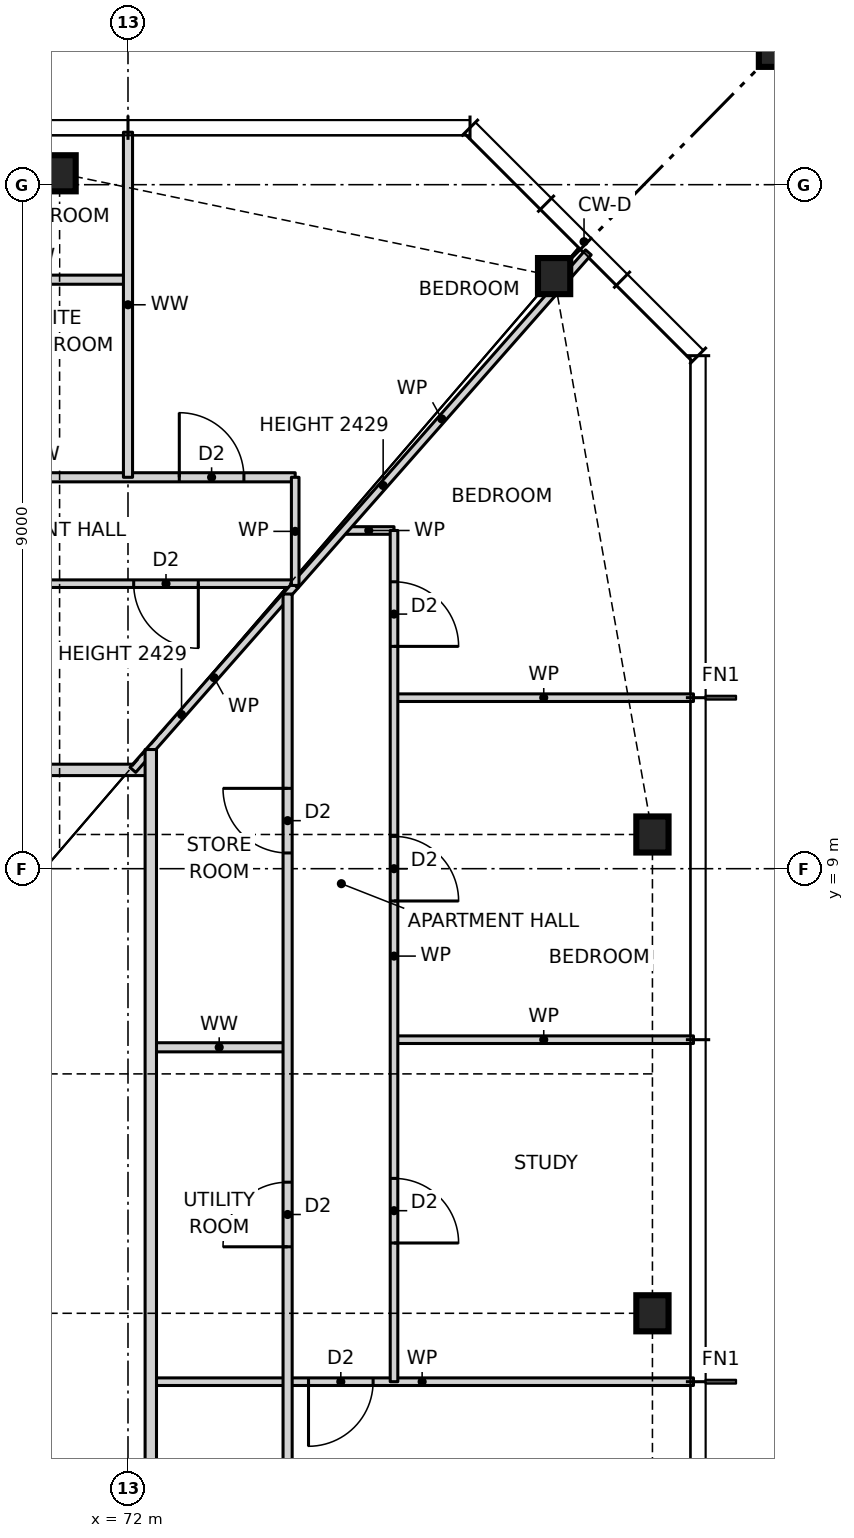
"""IFC4 building model, lengths in metres.
Left out: names, types, materials, properties, quantities, classifications, styles, units other than length and angle.
Written with IfcOpenShell. Run it as: python <this file> out.ifc"""

import sys

from ifc_helpers import new_model, si_unit, direction, frame, frame_2d, origin, origin_2d, place, context, subcontext, project, spatial, rectangle, hollow_rectangle, i_section, extrude, element, fill, save


model = new_model("IFC4")
c1 = context("Model", 3, precision=1e-05, world=origin(), true_north=direction((0.0, 1.0)))
c2 = subcontext(c1, "Body", "Model", "MODEL_VIEW")
j1 = project(units=[si_unit("LENGTHUNIT", "METRE"), si_unit("PLANEANGLEUNIT", "RADIAN")], contexts=[c1])
p1 = place(None, origin())
s1 = spatial("IfcSite", under=j1, at=p1, CompositionType="ELEMENT")
p2 = place(p1, origin())
s2 = spatial("IfcBuilding", under=s1, at=p2, CompositionType="ELEMENT")
p3 = place(p2, frame((0.0, 0.0, 22.0)))
s3 = spatial("IfcBuildingStorey", under=s2, at=p3, CompositionType="ELEMENT", Elevation=22.0)
for number, where, z_axis, x_axis in (
    (1, (78.9, 3.15, 0.0), (0.0, 0.0, 1.0), (1.0, 0.0, 0.0)),
    (2, (78.9, 9.45, 0.0), (0.0, 0.0, 1.0), (1.0, 0.0, 0.0)),
    (3, (77.606, 16.797, 0.0), (0.0, 0.0, 1.0), (1.0, 0.0, 0.0)),
    (4, (71.1, 18.15, 0.0), (0.0, 0.0, 1.0), (1.0, 0.0, 0.0)),
):
    element("IfcColumn", number, at=place(p3, frame(where, z_axis=z_axis, x_axis=x_axis)), inside=s3, PredefinedType="COLUMN", context=c2, shape_type="SweptSolid", body=[
        extrude(i_section(OverallWidth=0.424, OverallDepth=0.475, WebThickness=0.048, FlangeThickness=0.077, at=origin_2d()), origin(), (0.0, 0.0, 1.0), 3.5),
    ])
p4 = place(p3, frame((80.9, 20.15, 0.0), z_axis=(0.0, 0.0, 1.0), x_axis=(1.0, 0.0, 0.0)))
e5 = element("IfcColumn", 5, at=p4, inside=s3, PredefinedType="COLUMN", context=c2, shape_type="SweptSolid", body=[
    extrude(hollow_rectangle(XDim=1.2, YDim=1.2, WallThickness=0.07, at=origin_2d()), origin(), (0.0, 0.0, 1.0), 3.5),
])
p5 = place(p3, frame((72.3, 2.25, 0.0), z_axis=(0.0, 0.0, 1.0), x_axis=(1.0, 0.0, 0.0)))
e6 = element("IfcWall", 6, at=p5, inside=s3, PredefinedType="PARTITIONING", context=c2, shape_type="SweptSolid", body=[
    extrude(rectangle(XDim=7.14, YDim=0.1, at=frame_2d((3.57, 0.0))), origin(), (0.0, 0.0, 1.0), 3.27),
])
p6 = place(p5, frame((2.075, 0.0, 0.0)))
e7 = element("IfcOpeningElement", 7, at=p6, cuts=e6, PredefinedType="OPENING", context=c2, shape_type="SweptSolid", body=[
    extrude(rectangle(XDim=0.85, YDim=2.1, at=frame_2d((0.425, 1.05))), frame((0.0, 0.06, 0.0), z_axis=(0.0, -1.0, 0.0), x_axis=(1.0, 0.0, 0.0)), (0.0, 0.0, 1.0), 0.12),
])
p7 = place(p3, frame((72.3, 6.65, 0.0), z_axis=(0.0, 0.0, 1.0), x_axis=(1.0, 0.0, 0.0)))
e8 = element("IfcWall", 8, at=p7, inside=s3, PredefinedType="PARTITIONING", context=c2, shape_type="SweptSolid", body=[
    extrude(rectangle(XDim=1.8, YDim=0.12, at=frame_2d((0.9, 0.0))), origin(), (0.0, 0.0, 1.0), 3.27),
])
p8 = place(p3, frame((75.5, 6.75, 0.0), z_axis=(0.0, 0.0, 1.0), x_axis=(1.0, 0.0, 0.0)))
e9 = element("IfcWall", 9, at=p8, inside=s3, PredefinedType="PARTITIONING", context=c2, shape_type="SweptSolid", body=[
    extrude(rectangle(XDim=3.94, YDim=0.1, at=frame_2d((1.97, 0.0))), origin(), (0.0, 0.0, 1.0), 3.27),
])
p9 = place(p3, frame((53.7, 10.3, 0.0), z_axis=(0.0, 0.0, 1.0), x_axis=(1.0, 0.0, 0.0)))
e10 = element("IfcWall", 10, at=p9, inside=s3, PredefinedType="PARTITIONING", context=c2, shape_type="SweptSolid", body=[
    extrude(rectangle(XDim=18.6, YDim=0.15, at=frame_2d((9.3, 0.0))), origin(), (0.0, 0.0, 1.0), 3.27),
])
p10 = place(p9, frame((8.3, 0.0, 0.0)))
e11 = element("IfcOpeningElement", 11, at=p10, cuts=e10, PredefinedType="OPENING", context=c2, shape_type="SweptSolid", body=[
    extrude(rectangle(XDim=1.0, YDim=2.1, at=frame_2d((0.5, 1.05))), frame((0.0, 0.085, 0.0), z_axis=(0.0, -1.0, 0.0), x_axis=(1.0, 0.0, 0.0)), (0.0, 0.0, 1.0), 0.17),
])
p11 = place(p3, frame((75.5, 11.25, 0.0), z_axis=(0.0, 0.0, 1.0), x_axis=(1.0, 0.0, 0.0)))
e12 = element("IfcWall", 12, at=p11, inside=s3, PredefinedType="PARTITIONING", context=c2, shape_type="SweptSolid", body=[
    extrude(rectangle(XDim=3.94, YDim=0.1, at=frame_2d((1.97, 0.0))), origin(), (0.0, 0.0, 1.0), 3.27),
])
p12 = place(p3, frame((51.8, 12.75, 0.0), z_axis=(0.0, 0.0, 1.0), x_axis=(1.0, 0.0, 0.0)))
e13 = element("IfcWall", 13, at=p12, inside=s3, PredefinedType="PARTITIONING", context=c2, shape_type="SweptSolid", body=[
    extrude(rectangle(XDim=22.4, YDim=0.1, at=frame_2d((11.2, 0.0))), origin(), (0.0, 0.0, 1.0), 3.27),
])
p13 = place(p12, frame((13.475, 0.0, 0.0)))
e14 = element("IfcOpeningElement", 14, at=p13, cuts=e13, PredefinedType="OPENING", context=c2, shape_type="SweptSolid", body=[
    extrude(rectangle(XDim=0.85, YDim=2.1, at=frame_2d((0.425, 1.05))), frame((0.0, 0.06, 0.0), z_axis=(0.0, -1.0, 0.0), x_axis=(1.0, 0.0, 0.0)), (0.0, 0.0, 1.0), 0.12),
])
p14 = place(p12, frame((10.275, 0.0, 0.0)))
e15 = element("IfcOpeningElement", 15, at=p14, cuts=e13, PredefinedType="OPENING", context=c2, shape_type="SweptSolid", body=[
    extrude(rectangle(XDim=0.85, YDim=2.1, at=frame_2d((0.425, 1.05))), frame((0.0, 0.06, 0.0), z_axis=(0.0, -1.0, 0.0), x_axis=(1.0, 0.0, 0.0)), (0.0, 0.0, 1.0), 0.12),
])
p15 = place(p12, frame((16.925, 0.0, 0.0)))
e16 = element("IfcOpeningElement", 16, at=p15, cuts=e13, PredefinedType="OPENING", context=c2, shape_type="SweptSolid", body=[
    extrude(rectangle(XDim=0.85, YDim=2.1, at=frame_2d((0.425, 1.05))), frame((0.0, 0.06, 0.0), z_axis=(0.0, -1.0, 0.0), x_axis=(1.0, 0.0, 0.0)), (0.0, 0.0, 1.0), 0.12),
])
p16 = place(p12, frame((20.275, 0.0, 0.0)))
e17 = element("IfcOpeningElement", 17, at=p16, cuts=e13, PredefinedType="OPENING", context=c2, shape_type="SweptSolid", body=[
    extrude(rectangle(XDim=0.85, YDim=2.1, at=frame_2d((0.425, 1.05))), frame((0.0, 0.06, 0.0), z_axis=(0.0, -1.0, 0.0), x_axis=(1.0, 0.0, 0.0)), (0.0, 0.0, 1.0), 0.12),
])
p17 = place(p12, frame((4.625, 0.0, 0.0)))
e18 = element("IfcOpeningElement", 18, at=p17, cuts=e13, PredefinedType="OPENING", context=c2, shape_type="SweptSolid", body=[
    extrude(rectangle(XDim=0.85, YDim=2.1, at=frame_2d((0.425, 1.05))), frame((0.0, 0.06, 0.0), z_axis=(0.0, -1.0, 0.0), x_axis=(1.0, 0.0, 0.0)), (0.0, 0.0, 1.0), 0.12),
])
p18 = place(p12, frame((1.275, 0.0, 0.0)))
e19 = element("IfcOpeningElement", 19, at=p18, cuts=e13, PredefinedType="OPENING", context=c2, shape_type="SweptSolid", body=[
    extrude(rectangle(XDim=0.85, YDim=2.1, at=frame_2d((0.425, 1.05))), frame((0.0, 0.06, 0.0), z_axis=(0.0, -1.0, 0.0), x_axis=(1.0, 0.0, 0.0)), (0.0, 0.0, 1.0), 0.12),
])
p19 = place(p3, frame((74.836, 13.45, 0.0), z_axis=(0.0, 0.0, 1.0), x_axis=(1.0, 0.0, 0.0)))
e20 = element("IfcWall", 20, at=p19, inside=s3, PredefinedType="PARTITIONING", context=c2, shape_type="SweptSolid", body=[
    extrude(rectangle(XDim=0.664, YDim=0.1, at=frame_2d((0.332, 0.0))), origin(), (0.0, 0.0, 1.0), 3.27),
])
p20 = place(p3, frame((67.5, 14.15, 0.0), z_axis=(0.0, 0.0, 1.0), x_axis=(1.0, 0.0, 0.0)))
e21 = element("IfcWall", 21, at=p20, inside=s3, PredefinedType="PARTITIONING", context=c2, shape_type="SweptSolid", body=[
    extrude(rectangle(XDim=6.7, YDim=0.12, at=frame_2d((3.35, 0.0))), origin(), (0.0, 0.0, 1.0), 3.27),
])
p21 = place(p20, frame((0.625, 0.0, 0.0)))
e22 = element("IfcOpeningElement", 22, at=p21, cuts=e21, PredefinedType="OPENING", context=c2, shape_type="SweptSolid", body=[
    extrude(rectangle(XDim=0.85, YDim=2.1, at=frame_2d((0.425, 1.05))), frame((0.0, 0.07, 0.0), z_axis=(0.0, -1.0, 0.0), x_axis=(1.0, 0.0, 0.0)), (0.0, 0.0, 1.0), 0.14),
])
p22 = place(p20, frame((5.175, 0.0, 0.0)))
e23 = element("IfcOpeningElement", 23, at=p22, cuts=e21, PredefinedType="OPENING", context=c2, shape_type="SweptSolid", body=[
    extrude(rectangle(XDim=0.85, YDim=2.1, at=frame_2d((0.425, 1.05))), frame((0.0, 0.07, 0.0), z_axis=(0.0, -1.0, 0.0), x_axis=(1.0, 0.0, 0.0)), (0.0, 0.0, 1.0), 0.14),
])
p23 = place(p3, frame((69.6, 16.75, 0.0), z_axis=(0.0, 0.0, 1.0), x_axis=(1.0, 0.0, 0.0)))
e24 = element("IfcWall", 24, at=p23, inside=s3, PredefinedType="PARTITIONING", context=c2, shape_type="SweptSolid", body=[
    extrude(rectangle(XDim=2.4, YDim=0.12, at=frame_2d((1.2, 0.0))), origin(), (0.0, 0.0, 1.0), 3.27),
])
p24 = place(p3, frame((72.064, 10.3, 0.0), z_axis=(0.0, 0.0, 1.0), x_axis=(0.660667046586, 0.75067906162, 0.0)))
e25 = element("IfcWall", 25, at=p24, inside=s3, PredefinedType="PARTITIONING", context=c2, shape_type="SweptSolid", body=[
    extrude(rectangle(XDim=3.233, YDim=0.1, at=frame_2d((1.617, 0.0))), origin(), (0.0, 0.0, 1.0), 2.429),
])
p25 = place(p3, frame((74.2, 12.727, 0.0), z_axis=(0.0, 0.0, 1.0), x_axis=(0.660698595885, 0.750651294141, 0.0)))
e26 = element("IfcWall", 26, at=p25, inside=s3, PredefinedType="PARTITIONING", context=c2, shape_type="SweptSolid", body=[
    extrude(rectangle(XDim=5.838, YDim=0.1, at=frame_2d((2.919, 0.0))), origin(), (0.0, 0.0, 1.0), 2.429),
])
p26 = place(p3, frame((75.5, 2.25, 0.0), z_axis=(0.0, 0.0, 1.0), x_axis=(0.0, 1.0, 0.0)))
e27 = element("IfcWall", 27, at=p26, inside=s3, PredefinedType="PARTITIONING", context=c2, shape_type="SweptSolid", body=[
    extrude(rectangle(XDim=11.2, YDim=0.1, at=frame_2d((5.6, 0.0))), origin(), (0.0, 0.0, 1.0), 3.27),
])
p27 = place(p26, frame((1.825, 0.0, 0.0)))
e28 = element("IfcOpeningElement", 28, at=p27, cuts=e27, PredefinedType="OPENING", context=c2, shape_type="SweptSolid", body=[
    extrude(rectangle(XDim=0.85, YDim=2.1, at=frame_2d((0.425, 1.05))), frame((0.0, 0.06, 0.0), z_axis=(0.0, -1.0, 0.0), x_axis=(1.0, 0.0, 0.0)), (0.0, 0.0, 1.0), 0.12),
])
p28 = place(p26, frame((6.325, 0.0, 0.0)))
e29 = element("IfcOpeningElement", 29, at=p28, cuts=e27, PredefinedType="OPENING", context=c2, shape_type="SweptSolid", body=[
    extrude(rectangle(XDim=0.85, YDim=2.1, at=frame_2d((0.425, 1.05))), frame((0.0, 0.06, 0.0), z_axis=(0.0, -1.0, 0.0), x_axis=(1.0, 0.0, 0.0)), (0.0, 0.0, 1.0), 0.12),
])
p29 = place(p26, frame((9.675, 0.0, 0.0)))
e30 = element("IfcOpeningElement", 30, at=p29, cuts=e27, PredefinedType="OPENING", context=c2, shape_type="SweptSolid", body=[
    extrude(rectangle(XDim=0.85, YDim=2.1, at=frame_2d((0.425, 1.05))), frame((0.0, 0.06, 0.0), z_axis=(0.0, -1.0, 0.0), x_axis=(1.0, 0.0, 0.0)), (0.0, 0.0, 1.0), 0.12),
])
p30 = place(p3, frame((74.2, 12.727, 0.0), z_axis=(0.0, 0.0, 1.0), x_axis=(0.0, 1.0, 0.0)))
e31 = element("IfcWall", 31, at=p30, inside=s3, PredefinedType="PARTITIONING", context=c2, shape_type="SweptSolid", body=[
    extrude(rectangle(XDim=1.423, YDim=0.1, at=frame_2d((0.711, 0.0))), origin(), (0.0, 0.0, 1.0), 3.27),
])
p31 = place(p3, frame((74.1, -12.614, 0.0), z_axis=(0.0, 0.0, 1.0), x_axis=(0.0, 1.0, 0.0)))
e32 = element("IfcWall", 32, at=p31, inside=s3, PredefinedType="PARTITIONING", context=c2, shape_type="SweptSolid", body=[
    extrude(rectangle(XDim=25.228, YDim=0.12, at=frame_2d((12.614, 0.0))), origin(), (0.0, 0.0, 1.0), 3.27),
])
p32 = place(p31, frame((7.239, 0.0, 0.0)))
e33 = element("IfcOpeningElement", 33, at=p32, cuts=e32, PredefinedType="OPENING", context=c2, shape_type="SweptSolid", body=[
    extrude(rectangle(XDim=0.85, YDim=2.1, at=frame_2d((0.425, 1.05))), frame((0.0, 0.07, 0.0), z_axis=(0.0, -1.0, 0.0), x_axis=(1.0, 0.0, 0.0)), (0.0, 0.0, 1.0), 0.14),
])
p33 = place(p31, frame((10.439, 0.0, 0.0)))
e34 = element("IfcOpeningElement", 34, at=p33, cuts=e32, PredefinedType="OPENING", context=c2, shape_type="SweptSolid", body=[
    extrude(rectangle(XDim=0.85, YDim=2.1, at=frame_2d((0.425, 1.05))), frame((0.0, 0.07, 0.0), z_axis=(0.0, -1.0, 0.0), x_axis=(1.0, 0.0, 0.0)), (0.0, 0.0, 1.0), 0.14),
])
p34 = place(p31, frame((2.507, 0.0, 0.0)))
e35 = element("IfcOpeningElement", 35, at=p34, cuts=e32, PredefinedType="OPENING", context=c2, shape_type="SweptSolid", body=[
    extrude(rectangle(XDim=0.85, YDim=2.1, at=frame_2d((0.425, 1.05))), frame((0.0, 0.07, 0.0), z_axis=(0.0, -1.0, 0.0), x_axis=(1.0, 0.0, 0.0)), (0.0, 0.0, 1.0), 0.14),
])
p35 = place(p31, frame((16.639, 0.0, 0.0)))
e36 = element("IfcOpeningElement", 36, at=p35, cuts=e32, PredefinedType="OPENING", context=c2, shape_type="SweptSolid", body=[
    extrude(rectangle(XDim=0.85, YDim=2.1, at=frame_2d((0.425, 1.05))), frame((0.0, 0.07, 0.0), z_axis=(0.0, -1.0, 0.0), x_axis=(1.0, 0.0, 0.0)), (0.0, 0.0, 1.0), 0.14),
])
p36 = place(p31, frame((21.821, 0.0, 0.0)))
e37 = element("IfcOpeningElement", 37, at=p36, cuts=e32, PredefinedType="OPENING", context=c2, shape_type="SweptSolid", body=[
    extrude(rectangle(XDim=0.85, YDim=2.1, at=frame_2d((0.425, 1.05))), frame((0.0, 0.07, 0.0), z_axis=(0.0, -1.0, 0.0), x_axis=(1.0, 0.0, 0.0)), (0.0, 0.0, 1.0), 0.14),
])
p37 = place(p3, frame((72.3, -10.9, 0.0), z_axis=(0.0, 0.0, 1.0), x_axis=(0.0, 1.0, 0.0)))
e38 = element("IfcWall", 38, at=p37, inside=s3, PredefinedType="PARTITIONING", context=c2, shape_type="SweptSolid", body=[
    extrude(rectangle(XDim=21.468, YDim=0.15, at=frame_2d((10.734, 0.0))), origin(), (0.0, 0.0, 1.0), 3.27),
])
p38 = place(p37, frame((8.65, 0.0, 0.0)))
e39 = element("IfcOpeningElement", 39, at=p38, cuts=e38, PredefinedType="OPENING", context=c2, shape_type="SweptSolid", body=[
    extrude(rectangle(XDim=1.0, YDim=2.1, at=frame_2d((0.5, 1.05))), frame((0.0, 0.085, 0.0), z_axis=(0.0, -1.0, 0.0), x_axis=(1.0, 0.0, 0.0)), (0.0, 0.0, 1.0), 0.17),
])
p39 = place(p3, frame((72.0, 14.15, 0.0), z_axis=(0.0, 0.0, 1.0), x_axis=(0.0, 1.0, 0.0)))
e40 = element("IfcWall", 40, at=p39, inside=s3, PredefinedType="PARTITIONING", context=c2, shape_type="SweptSolid", body=[
    extrude(rectangle(XDim=4.54, YDim=0.12, at=frame_2d((2.27, 0.0))), origin(), (0.0, 0.0, 1.0), 3.27),
])
p40 = place(p6, frame((0.85, 0.0, 0.0), z_axis=(0.0, 0.0, 1.0), x_axis=(-1.0, 0.0, 0.0)))
e41 = element("IfcDoor", 41, at=p40, inside=s3, OperationType="SINGLE_SWING_RIGHT", PredefinedType="DOOR", context=c2, shape_type="SweptSolid", body=[
    extrude(rectangle(XDim=0.85, YDim=2.1, at=frame_2d((0.425, 1.05))), frame((0.0, 0.025, 0.0), z_axis=(0.0, -1.0, 0.0), x_axis=(1.0, 0.0, 0.0)), (0.0, 0.0, 1.0), 0.05),
])
fill(e7, e41)
p41 = place(p27, frame((0.85, 0.0, 0.0), z_axis=(0.0, 0.0, 1.0), x_axis=(-1.0, 0.0, 0.0)))
e42 = element("IfcDoor", 42, at=p41, inside=s3, OperationType="SINGLE_SWING_RIGHT", PredefinedType="DOOR", context=c2, shape_type="SweptSolid", body=[
    extrude(rectangle(XDim=0.85, YDim=2.1, at=frame_2d((0.425, 1.05))), frame((0.0, 0.025, 0.0), z_axis=(0.0, -1.0, 0.0), x_axis=(1.0, 0.0, 0.0)), (0.0, 0.0, 1.0), 0.05),
])
fill(e28, e42)
p42 = place(p28, frame((0.85, 0.0, 0.0), z_axis=(0.0, 0.0, 1.0), x_axis=(-1.0, 0.0, 0.0)))
e43 = element("IfcDoor", 43, at=p42, inside=s3, OperationType="SINGLE_SWING_RIGHT", PredefinedType="DOOR", context=c2, shape_type="SweptSolid", body=[
    extrude(rectangle(XDim=0.85, YDim=2.1, at=frame_2d((0.425, 1.05))), frame((0.0, 0.025, 0.0), z_axis=(0.0, -1.0, 0.0), x_axis=(1.0, 0.0, 0.0)), (0.0, 0.0, 1.0), 0.05),
])
fill(e29, e43)
p43 = place(p29, frame((0.85, 0.0, 0.0), z_axis=(0.0, 0.0, 1.0), x_axis=(-1.0, 0.0, 0.0)))
e44 = element("IfcDoor", 44, at=p43, inside=s3, OperationType="SINGLE_SWING_RIGHT", PredefinedType="DOOR", context=c2, shape_type="SweptSolid", body=[
    extrude(rectangle(XDim=0.85, YDim=2.1, at=frame_2d((0.425, 1.05))), frame((0.0, 0.025, 0.0), z_axis=(0.0, -1.0, 0.0), x_axis=(1.0, 0.0, 0.0)), (0.0, 0.0, 1.0), 0.05),
])
fill(e30, e44)
p44 = place(p35, origin())
e45 = element("IfcDoor", 45, at=p44, inside=s3, OperationType="SINGLE_SWING_LEFT", PredefinedType="DOOR", context=c2, shape_type="SweptSolid", body=[
    extrude(rectangle(XDim=0.85, YDim=2.1, at=frame_2d((0.425, 1.05))), frame((0.0, 0.025, 0.0), z_axis=(0.0, -1.0, 0.0), x_axis=(1.0, 0.0, 0.0)), (0.0, 0.0, 1.0), 0.05),
])
fill(e36, e45)
p45 = place(p36, origin())
e46 = element("IfcDoor", 46, at=p45, inside=s3, OperationType="SINGLE_SWING_RIGHT", PredefinedType="DOOR", context=c2, shape_type="SweptSolid", body=[
    extrude(rectangle(XDim=0.85, YDim=2.1, at=frame_2d((0.425, 1.05))), frame((0.0, 0.025, 0.0), z_axis=(0.0, -1.0, 0.0), x_axis=(1.0, 0.0, 0.0)), (0.0, 0.0, 1.0), 0.05),
])
fill(e37, e46)
p46 = place(p22, origin())
e47 = element("IfcDoor", 47, at=p46, inside=s3, OperationType="SINGLE_SWING_LEFT", PredefinedType="DOOR", context=c2, shape_type="SweptSolid", body=[
    extrude(rectangle(XDim=0.85, YDim=2.1, at=frame_2d((0.425, 1.05))), frame((0.0, 0.025, 0.0), z_axis=(0.0, -1.0, 0.0), x_axis=(1.0, 0.0, 0.0)), (0.0, 0.0, 1.0), 0.05),
])
fill(e23, e47)
p47 = place(p16, frame((0.85, 0.0, 0.0), z_axis=(0.0, 0.0, 1.0), x_axis=(-1.0, 0.0, 0.0)))
e48 = element("IfcDoor", 48, at=p47, inside=s3, OperationType="SINGLE_SWING_LEFT", PredefinedType="DOOR", context=c2, shape_type="SweptSolid", body=[
    extrude(rectangle(XDim=0.85, YDim=2.1, at=frame_2d((0.425, 1.05))), frame((0.0, 0.025, 0.0), z_axis=(0.0, -1.0, 0.0), x_axis=(1.0, 0.0, 0.0)), (0.0, 0.0, 1.0), 0.05),
])
fill(e17, e48)
save(model, sys.argv[1])
